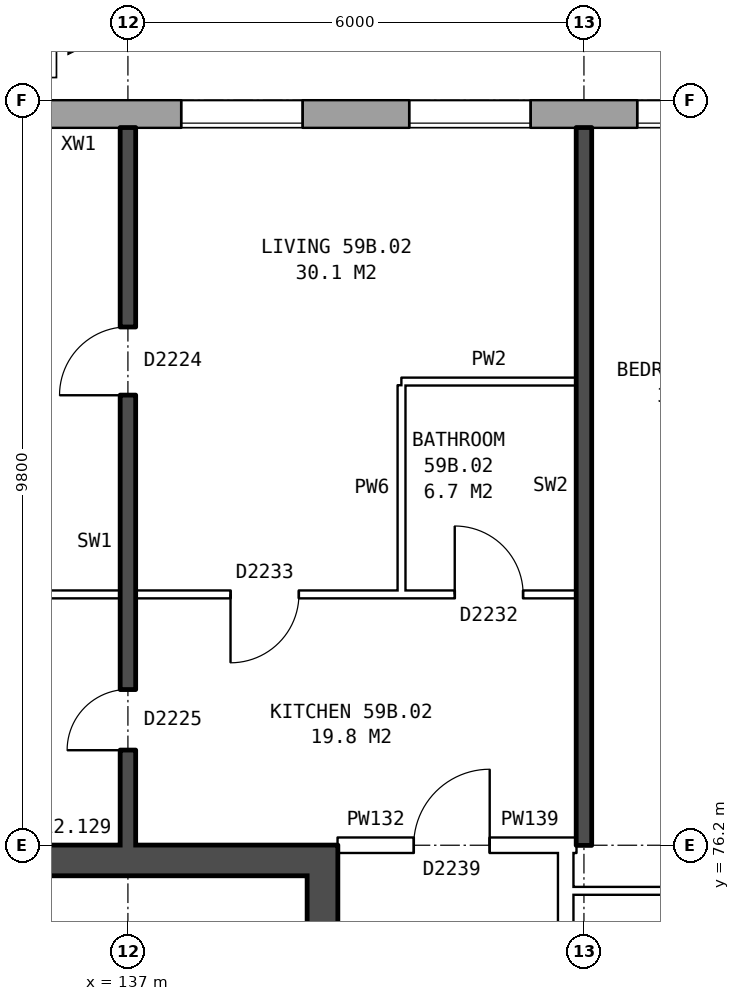
"""IFC4 building model, lengths in metres.
Left out: names, types, materials, properties, quantities, classifications, styles, units other than length and angle.
Written with IfcOpenShell. Run it as: python <this file> out.ifc"""

import sys

from ifc_helpers import new_model, si_unit, direction, frame, frame_2d, origin, place, context, subcontext, project, spatial, rectangle, extrude, element, fill, save


model = new_model("IFC4")
c1 = context("Model", 3, precision=1e-05, world=origin(), true_north=direction((0.0, 1.0)))
c2 = subcontext(c1, "Body", "Model", "MODEL_VIEW")
j1 = project(units=[si_unit("LENGTHUNIT", "METRE"), si_unit("PLANEANGLEUNIT", "RADIAN")], contexts=[c1])
p1 = place(None, origin())
s1 = spatial("IfcSite", under=j1, at=p1, CompositionType="ELEMENT")
p2 = place(p1, origin())
s2 = spatial("IfcBuilding", under=s1, at=p2, CompositionType="ELEMENT")
p3 = place(p2, frame((0.0, 0.0, 209.0)))
s3 = spatial("IfcBuildingStorey", under=s2, at=p3, CompositionType="ELEMENT", Elevation=209.0)
p4 = place(p3, frame((165.925, 85.82, 0.0), z_axis=(0.0, 0.0, 1.0), x_axis=(-1.0, 0.0, 0.0)))
e1 = element("IfcWall", 1, at=p4, inside=s3, PredefinedType="STANDARD", context=c2, shape_type="SweptSolid", body=[
    extrude(rectangle(XDim=33.875, YDim=0.36, at=frame_2d((16.938, 0.0))), origin(), (0.0, 0.0, 1.0), 2.85),
])
p5 = place(p4, frame((2.625, 0.0, 0.8)))
e2 = element("IfcOpeningElement", 2, at=p5, cuts=e1, PredefinedType="OPENING", context=c2, shape_type="SweptSolid", body=[
    extrude(rectangle(XDim=1.6, YDim=1.8, at=frame_2d((0.8, 0.9))), frame((0.0, 0.19, 0.0), z_axis=(0.0, -1.0, 0.0), x_axis=(1.0, 0.0, 0.0)), (0.0, 0.0, 1.0), 0.38),
])
p6 = place(p4, frame((5.625, 0.0, 0.8)))
e3 = element("IfcOpeningElement", 3, at=p6, cuts=e1, PredefinedType="OPENING", context=c2, shape_type="SweptSolid", body=[
    extrude(rectangle(XDim=1.6, YDim=1.8, at=frame_2d((0.8, 0.9))), frame((0.0, 0.19, 0.0), z_axis=(0.0, -1.0, 0.0), x_axis=(1.0, 0.0, 0.0)), (0.0, 0.0, 1.0), 0.38),
])
p7 = place(p4, frame((8.625, 0.0, 0.8)))
e4 = element("IfcOpeningElement", 4, at=p7, cuts=e1, PredefinedType="OPENING", context=c2, shape_type="SweptSolid", body=[
    extrude(rectangle(XDim=1.6, YDim=1.8, at=frame_2d((0.8, 0.9))), frame((0.0, 0.19, 0.0), z_axis=(0.0, -1.0, 0.0), x_axis=(1.0, 0.0, 0.0)), (0.0, 0.0, 1.0), 0.38),
])
p8 = place(p4, frame((11.625, 0.0, 0.8)))
e5 = element("IfcOpeningElement", 5, at=p8, cuts=e1, PredefinedType="OPENING", context=c2, shape_type="SweptSolid", body=[
    extrude(rectangle(XDim=1.6, YDim=1.8, at=frame_2d((0.8, 0.9))), frame((0.0, 0.19, 0.0), z_axis=(0.0, -1.0, 0.0), x_axis=(1.0, 0.0, 0.0)), (0.0, 0.0, 1.0), 0.38),
])
p9 = place(p4, frame((14.625, 0.0, 0.8)))
e6 = element("IfcOpeningElement", 6, at=p9, cuts=e1, PredefinedType="OPENING", context=c2, shape_type="SweptSolid", body=[
    extrude(rectangle(XDim=1.6, YDim=1.8, at=frame_2d((0.8, 0.9))), frame((0.0, 0.19, 0.0), z_axis=(0.0, -1.0, 0.0), x_axis=(1.0, 0.0, 0.0)), (0.0, 0.0, 1.0), 0.38),
])
p10 = place(p4, frame((17.625, 0.0, 0.8)))
e7 = element("IfcOpeningElement", 7, at=p10, cuts=e1, PredefinedType="OPENING", context=c2, shape_type="SweptSolid", body=[
    extrude(rectangle(XDim=1.6, YDim=1.8, at=frame_2d((0.8, 0.9))), frame((0.0, 0.19, 0.0), z_axis=(0.0, -1.0, 0.0), x_axis=(1.0, 0.0, 0.0)), (0.0, 0.0, 1.0), 0.38),
])
p11 = place(p4, frame((20.625, 0.0, 0.8)))
e8 = element("IfcOpeningElement", 8, at=p11, cuts=e1, PredefinedType="OPENING", context=c2, shape_type="SweptSolid", body=[
    extrude(rectangle(XDim=1.6, YDim=1.8, at=frame_2d((0.8, 0.9))), frame((0.0, 0.19, 0.0), z_axis=(0.0, -1.0, 0.0), x_axis=(1.0, 0.0, 0.0)), (0.0, 0.0, 1.0), 0.38),
])
p12 = place(p4, frame((23.625, 0.0, 0.8)))
e9 = element("IfcOpeningElement", 9, at=p12, cuts=e1, PredefinedType="OPENING", context=c2, shape_type="SweptSolid", body=[
    extrude(rectangle(XDim=1.6, YDim=1.8, at=frame_2d((0.8, 0.9))), frame((0.0, 0.19, 0.0), z_axis=(0.0, -1.0, 0.0), x_axis=(1.0, 0.0, 0.0)), (0.0, 0.0, 1.0), 0.38),
])
p13 = place(p4, frame((26.625, 0.0, 0.8)))
e10 = element("IfcOpeningElement", 10, at=p13, cuts=e1, PredefinedType="OPENING", context=c2, shape_type="SweptSolid", body=[
    extrude(rectangle(XDim=1.6, YDim=1.8, at=frame_2d((0.8, 0.9))), frame((0.0, 0.19, 0.0), z_axis=(0.0, -1.0, 0.0), x_axis=(1.0, 0.0, 0.0)), (0.0, 0.0, 1.0), 0.38),
])
p14 = place(p4, frame((30.925, 0.0, 1.1)))
e11 = element("IfcOpeningElement", 11, at=p14, cuts=e1, PredefinedType="OPENING", context=c2, shape_type="SweptSolid", body=[
    extrude(rectangle(XDim=0.8, YDim=1.5, at=frame_2d((0.4, 0.75))), frame((0.0, 0.19, 0.0), z_axis=(0.0, -1.0, 0.0), x_axis=(1.0, 0.0, 0.0)), (0.0, 0.0, 1.0), 0.38),
])
p15 = place(p4, frame((32.025, 0.0, 0.8)))
e12 = element("IfcOpeningElement", 12, at=p15, cuts=e1, PredefinedType="OPENING", context=c2, shape_type="SweptSolid", body=[
    extrude(rectangle(XDim=1.4, YDim=1.8, at=frame_2d((0.7, 0.9))), frame((0.0, 0.19, 0.0), z_axis=(0.0, -1.0, 0.0), x_axis=(1.0, 0.0, 0.0)), (0.0, 0.0, 1.0), 0.38),
])
p16 = place(p3, frame((139.56, 63.8, 0.0), z_axis=(0.0, 0.0, 1.0), x_axis=(0.0, 1.0, 0.0)))
e13 = element("IfcWall", 13, at=p16, inside=s3, PredefinedType="SHEAR", context=c2, shape_type="SweptSolid", body=[
    extrude(rectangle(XDim=12.4, YDim=0.4, at=frame_2d((6.2, 0.0))), origin(), (0.0, 0.0, 1.0), 2.85),
])
p17 = place(p16, frame((1.325, 0.0, 0.0)))
e14 = element("IfcOpeningElement", 14, at=p17, cuts=e13, PredefinedType="OPENING", context=c2, shape_type="SweptSolid", body=[
    extrude(rectangle(XDim=1.1, YDim=2.1, at=frame_2d((0.55, 1.05))), frame((0.0, 0.21, 0.0), z_axis=(0.0, -1.0, 0.0), x_axis=(1.0, 0.0, 0.0)), (0.0, 0.0, 1.0), 0.42),
])
p18 = place(p16, frame((3.6, 0.0, 0.0)))
e15 = element("IfcOpeningElement", 15, at=p18, cuts=e13, PredefinedType="OPENING", context=c2, shape_type="SweptSolid", body=[
    extrude(rectangle(XDim=1.1, YDim=2.1, at=frame_2d((0.55, 1.05))), frame((0.0, 0.21, 0.0), z_axis=(0.0, -1.0, 0.0), x_axis=(1.0, 0.0, 0.0)), (0.0, 0.0, 1.0), 0.42),
])
p19 = place(p16, frame((5.8, 0.0, 0.0)))
e16 = element("IfcOpeningElement", 16, at=p19, cuts=e13, PredefinedType="OPENING", context=c2, shape_type="SweptSolid", body=[
    extrude(rectangle(XDim=1.1, YDim=2.1, at=frame_2d((0.55, 1.05))), frame((0.0, 0.21, 0.0), z_axis=(0.0, -1.0, 0.0), x_axis=(1.0, 0.0, 0.0)), (0.0, 0.0, 1.0), 0.42),
])
p20 = place(p16, frame((9.9, 0.0, 0.0)))
e17 = element("IfcOpeningElement", 17, at=p20, cuts=e13, PredefinedType="OPENING", context=c2, shape_type="SweptSolid", body=[
    extrude(rectangle(XDim=1.1, YDim=2.1, at=frame_2d((0.55, 1.05))), frame((0.0, 0.21, 0.0), z_axis=(0.0, -1.0, 0.0), x_axis=(1.0, 0.0, 0.0)), (0.0, 0.0, 1.0), 0.42),
])
p21 = place(p16, frame((8.125, 0.0, 0.0)))
e18 = element("IfcOpeningElement", 18, at=p21, cuts=e13, PredefinedType="OPENING", context=c2, shape_type="SweptSolid", body=[
    extrude(rectangle(XDim=0.85, YDim=2.1, at=frame_2d((0.425, 1.05))), frame((0.0, 0.21, 0.0), z_axis=(0.0, -1.0, 0.0), x_axis=(1.0, 0.0, 0.0)), (0.0, 0.0, 1.0), 0.42),
])
p22 = place(p3, frame((139.36, 76.0, 0.0), z_axis=(0.0, 0.0, 1.0), x_axis=(-1.0, 0.0, 0.0)))
e19 = element("IfcWall", 19, at=p22, inside=s3, PredefinedType="SHEAR", context=c2, shape_type="SweptSolid", body=[
    extrude(rectangle(XDim=7.6, YDim=0.4, at=frame_2d((3.8, 0.0))), origin(), (0.0, 0.0, 1.0), 2.85),
])
p23 = place(p3, frame((142.76, 63.9, 0.0), z_axis=(0.0, 0.0, 1.0), x_axis=(0.0, 1.0, 0.0)))
e20 = element("IfcWall", 20, at=p23, inside=s3, PredefinedType="PARTITIONING", context=c2, shape_type="SweptSolid", body=[
    extrude(rectangle(XDim=12.2, YDim=0.2, at=frame_2d((6.1, 0.0))), origin(), (0.0, 0.0, 1.0), 2.85),
])
p24 = place(p23, frame((5.1, 0.0, 0.0)))
e21 = element("IfcOpeningElement", 21, at=p24, cuts=e20, PredefinedType="OPENING", context=c2, shape_type="SweptSolid", body=[
    extrude(rectangle(XDim=2.0, YDim=2.1, at=frame_2d((1.0, 1.05))), frame((0.0, 0.11, 0.0), z_axis=(0.0, -1.0, 0.0), x_axis=(1.0, 0.0, 0.0)), (0.0, 0.0, 1.0), 0.22),
])
p25 = place(p3, frame((142.76, 75.6, 0.0), z_axis=(0.0, 0.0, 1.0), x_axis=(1.0, 0.0, 0.0)))
e22 = element("IfcWall", 22, at=p25, inside=s3, PredefinedType="PARTITIONING", context=c2, shape_type="SweptSolid", body=[
    extrude(rectangle(XDim=3.24, YDim=0.1, at=frame_2d((1.62, 0.0))), origin(), (0.0, 0.0, 1.0), 2.85),
])
p26 = place(p3, frame((139.76, 76.2, 0.0), z_axis=(0.0, 0.0, 1.0), x_axis=(1.0, 0.0, 0.0)))
e23 = element("IfcWall", 23, at=p26, inside=s3, PredefinedType="PARTITIONING", context=c2, shape_type="SweptSolid", body=[
    extrude(rectangle(XDim=3.0, YDim=0.2, at=frame_2d((1.5, 0.0))), origin(), (0.0, 0.0, 1.0), 2.85),
])
p27 = place(p26, frame((1.0, 0.0, 0.0)))
e24 = element("IfcOpeningElement", 24, at=p27, cuts=e23, PredefinedType="OPENING", context=c2, shape_type="SweptSolid", body=[
    extrude(rectangle(XDim=1.0, YDim=2.1, at=frame_2d((0.5, 1.05))), frame((0.0, 0.11, 0.0), z_axis=(0.0, -1.0, 0.0), x_axis=(1.0, 0.0, 0.0)), (0.0, 0.0, 1.0), 0.22),
])
p28 = place(p3, frame((142.76, 76.2, 0.0), z_axis=(0.0, 0.0, 1.0), x_axis=(1.0, 0.0, 0.0)))
e25 = element("IfcWall", 25, at=p28, inside=s3, PredefinedType="PARTITIONING", context=c2, shape_type="SweptSolid", body=[
    extrude(rectangle(XDim=0.14, YDim=0.2, at=frame_2d((0.07, 0.0))), origin(), (0.0, 0.0, 1.0), 2.85),
])
p29 = place(p3, frame((131.1, 79.5, 0.0), z_axis=(0.0, 0.0, 1.0), x_axis=(1.0, 0.0, 0.0)))
e26 = element("IfcWall", 26, at=p29, inside=s3, PredefinedType="PARTITIONING", context=c2, shape_type="SweptSolid", body=[
    extrude(rectangle(XDim=11.8, YDim=0.1, at=frame_2d((5.9, 0.0))), origin(), (0.0, 0.0, 1.0), 2.85),
])
p30 = place(p29, frame((7.25, 0.0, 0.0)))
e27 = element("IfcOpeningElement", 27, at=p30, cuts=e26, PredefinedType="OPENING", context=c2, shape_type="SweptSolid", body=[
    extrude(rectangle(XDim=0.9, YDim=2.1, at=frame_2d((0.45, 1.05))), frame((0.0, 0.06, 0.0), z_axis=(0.0, -1.0, 0.0), x_axis=(1.0, 0.0, 0.0)), (0.0, 0.0, 1.0), 0.12),
])
p31 = place(p29, frame((10.2, 0.0, 0.0)))
e28 = element("IfcOpeningElement", 28, at=p31, cuts=e26, PredefinedType="OPENING", context=c2, shape_type="SweptSolid", body=[
    extrude(rectangle(XDim=0.9, YDim=2.1, at=frame_2d((0.45, 1.05))), frame((0.0, 0.06, 0.0), z_axis=(0.0, -1.0, 0.0), x_axis=(1.0, 0.0, 0.0)), (0.0, 0.0, 1.0), 0.12),
])
p32 = place(p3, frame((140.6, 82.3, 0.0), z_axis=(0.0, 0.0, 1.0), x_axis=(1.0, 0.0, 0.0)))
e29 = element("IfcWall", 29, at=p32, inside=s3, PredefinedType="PARTITIONING", context=c2, shape_type="SweptSolid", body=[
    extrude(rectangle(XDim=2.3, YDim=0.1, at=frame_2d((1.15, 0.0))), origin(), (0.0, 0.0, 1.0), 2.85),
])
p33 = place(p3, frame((137.0, 76.2, 0.0), z_axis=(0.0, 0.0, 1.0), x_axis=(0.0, 1.0, 0.0)))
e30 = element("IfcWall", 30, at=p33, inside=s3, PredefinedType="SOLIDWALL", context=c2, shape_type="SweptSolid", body=[
    extrude(rectangle(XDim=9.44, YDim=0.2, at=frame_2d((4.72, 0.0))), origin(), (0.0, 0.0, 1.0), 2.85),
])
p34 = place(p33, frame((5.92, 0.0, 0.0)))
e31 = element("IfcOpeningElement", 31, at=p34, cuts=e30, PredefinedType="OPENING", context=c2, shape_type="SweptSolid", body=[
    extrude(rectangle(XDim=0.9, YDim=2.1, at=frame_2d((0.45, 1.05))), frame((0.0, 0.11, 0.0), z_axis=(0.0, -1.0, 0.0), x_axis=(1.0, 0.0, 0.0)), (0.0, 0.0, 1.0), 0.22),
])
p35 = place(p33, frame((1.25, 0.0, 0.0)))
e32 = element("IfcOpeningElement", 32, at=p35, cuts=e30, PredefinedType="OPENING", context=c2, shape_type="SweptSolid", body=[
    extrude(rectangle(XDim=0.8, YDim=2.1, at=frame_2d((0.4, 1.05))), frame((0.0, 0.11, 0.0), z_axis=(0.0, -1.0, 0.0), x_axis=(1.0, 0.0, 0.0)), (0.0, 0.0, 1.0), 0.22),
])
p36 = place(p3, frame((140.6, 79.55, 0.0), z_axis=(0.0, 0.0, 1.0), x_axis=(0.0, 1.0, 0.0)))
e33 = element("IfcWall", 33, at=p36, inside=s3, PredefinedType="PARTITIONING", context=c2, shape_type="SweptSolid", body=[
    extrude(rectangle(XDim=2.7, YDim=0.1, at=frame_2d((1.35, 0.0))), origin(), (0.0, 0.0, 1.0), 2.85),
])
p37 = place(p3, frame((143.0, 76.2, 0.0), z_axis=(0.0, 0.0, 1.0), x_axis=(0.0, 1.0, 0.0)))
e34 = element("IfcWall", 34, at=p37, inside=s3, PredefinedType="SOLIDWALL", context=c2, shape_type="SweptSolid", body=[
    extrude(rectangle(XDim=9.44, YDim=0.2, at=frame_2d((4.72, 0.0))), origin(), (0.0, 0.0, 1.0), 2.85),
])
p38 = place(p11, origin())
e35 = element("IfcWindow", 35, at=p38, inside=s3, PartitioningType="SINGLE_PANEL", PredefinedType="WINDOW", context=c2, shape_type="SweptSolid", body=[
    extrude(rectangle(XDim=1.6, YDim=1.8, at=frame_2d((0.8, 0.9))), frame((0.0, 0.15, 0.0), z_axis=(0.0, -1.0, 0.0), x_axis=(1.0, 0.0, 0.0)), (0.0, 0.0, 1.0), 0.06),
])
fill(e8, e35)
p39 = place(p12, origin())
e36 = element("IfcWindow", 36, at=p39, inside=s3, PartitioningType="SINGLE_PANEL", PredefinedType="WINDOW", context=c2, shape_type="SweptSolid", body=[
    extrude(rectangle(XDim=1.6, YDim=1.8, at=frame_2d((0.8, 0.9))), frame((0.0, 0.15, 0.0), z_axis=(0.0, -1.0, 0.0), x_axis=(1.0, 0.0, 0.0)), (0.0, 0.0, 1.0), 0.06),
])
fill(e9, e36)
p40 = place(p13, origin())
e37 = element("IfcWindow", 37, at=p40, inside=s3, PartitioningType="SINGLE_PANEL", PredefinedType="WINDOW", context=c2, shape_type="SweptSolid", body=[
    extrude(rectangle(XDim=1.6, YDim=1.8, at=frame_2d((0.8, 0.9))), frame((0.0, 0.15, 0.0), z_axis=(0.0, -1.0, 0.0), x_axis=(1.0, 0.0, 0.0)), (0.0, 0.0, 1.0), 0.06),
])
fill(e10, e37)
p41 = place(p34, origin())
e38 = element("IfcDoor", 38, at=p41, inside=s3, OperationType="SINGLE_SWING_LEFT", PredefinedType="DOOR", context=c2, shape_type="SweptSolid", body=[
    extrude(rectangle(XDim=0.9, YDim=2.1, at=frame_2d((0.45, 1.05))), frame((0.0, 0.025, 0.0), z_axis=(0.0, -1.0, 0.0), x_axis=(1.0, 0.0, 0.0)), (0.0, 0.0, 1.0), 0.05),
])
fill(e31, e38)
p42 = place(p27, origin())
e39 = element("IfcDoor", 39, at=p42, inside=s3, OperationType="SINGLE_SWING_RIGHT", PredefinedType="DOOR", context=c2, shape_type="SweptSolid", body=[
    extrude(rectangle(XDim=1.0, YDim=2.1, at=frame_2d((0.5, 1.05))), frame((0.0, 0.025, 0.0), z_axis=(0.0, -1.0, 0.0), x_axis=(1.0, 0.0, 0.0)), (0.0, 0.0, 1.0), 0.05),
])
fill(e24, e39)
p43 = place(p30, frame((0.9, 0.0, 0.0), z_axis=(0.0, 0.0, 1.0), x_axis=(-1.0, 0.0, 0.0)))
e40 = element("IfcDoor", 40, at=p43, inside=s3, OperationType="SINGLE_SWING_RIGHT", PredefinedType="DOOR", context=c2, shape_type="SweptSolid", body=[
    extrude(rectangle(XDim=0.9, YDim=2.1, at=frame_2d((0.45, 1.05))), frame((0.0, 0.025, 0.0), z_axis=(0.0, -1.0, 0.0), x_axis=(1.0, 0.0, 0.0)), (0.0, 0.0, 1.0), 0.05),
])
fill(e27, e40)
p44 = place(p35, origin())
e41 = element("IfcDoor", 41, at=p44, inside=s3, OperationType="SINGLE_SWING_LEFT", PredefinedType="DOOR", context=c2, shape_type="SweptSolid", body=[
    extrude(rectangle(XDim=0.8, YDim=2.1, at=frame_2d((0.4, 1.05))), frame((0.0, 0.025, 0.0), z_axis=(0.0, -1.0, 0.0), x_axis=(1.0, 0.0, 0.0)), (0.0, 0.0, 1.0), 0.05),
])
fill(e32, e41)
p45 = place(p31, origin())
e42 = element("IfcDoor", 42, at=p45, inside=s3, OperationType="SINGLE_SWING_LEFT", PredefinedType="DOOR", context=c2, shape_type="SweptSolid", body=[
    extrude(rectangle(XDim=0.9, YDim=2.1, at=frame_2d((0.45, 1.05))), frame((0.0, 0.025, 0.0), z_axis=(0.0, -1.0, 0.0), x_axis=(1.0, 0.0, 0.0)), (0.0, 0.0, 1.0), 0.05),
])
fill(e28, e42)
save(model, sys.argv[1])
